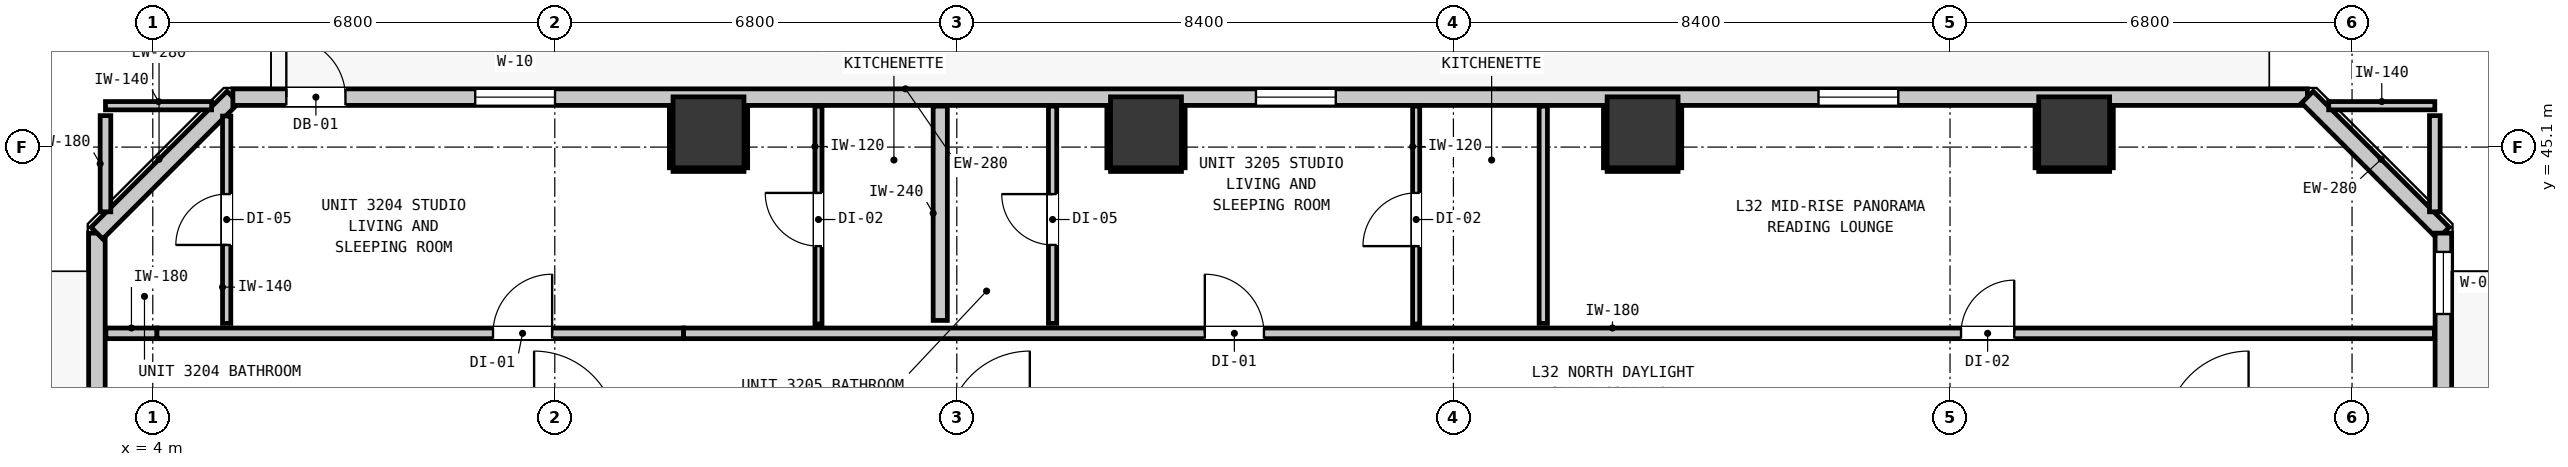
"""IFC4 building model, lengths in metres.
Left out: names, types, materials, properties, quantities, classifications, styles, units other than length and angle.
Written with IfcOpenShell. Run it as: python <this file> out.ifc"""

import sys

from ifc_helpers import new_model, si_unit, direction, frame, frame_2d, origin, origin_2d, place, context, subcontext, project, spatial, rectangle, extrude, element, fill, save


model = new_model("IFC4")
c1 = context("Model", 3, precision=1e-05, world=origin(), true_north=direction((0.0, 1.0)))
c2 = subcontext(c1, "Body", "Model", "MODEL_VIEW")
j1 = project(units=[si_unit("LENGTHUNIT", "METRE"), si_unit("PLANEANGLEUNIT", "RADIAN")], contexts=[c1])
p1 = place(None, origin())
s1 = spatial("IfcSite", under=j1, at=p1, CompositionType="ELEMENT")
p2 = place(p1, origin())
s2 = spatial("IfcBuilding", under=s1, at=p2, CompositionType="ELEMENT")
p3 = place(p2, frame((0.0, 0.0, 112.72)))
s3 = spatial("IfcBuildingStorey", under=s2, at=p3, CompositionType="ELEMENT", Elevation=112.72)
for number, where, z_axis, x_axis in (
    (1, (13.4, 45.35, 0.0), (0.0, 0.0, 1.0), (1.0, 0.0, 0.0)),
    (2, (20.8, 45.35, 0.0), (0.0, 0.0, 1.0), (1.0, 0.0, 0.0)),
    (3, (29.2, 45.35, 0.0), (0.0, 0.0, 1.0), (1.0, 0.0, 0.0)),
    (4, (36.5, 45.35, 0.0), (0.0, 0.0, 1.0), (1.0, 0.0, 0.0)),
):
    element("IfcColumn", number, at=place(p3, frame(where, z_axis=z_axis, x_axis=x_axis)), inside=s3, PredefinedType="COLUMN", context=c2, shape_type="SweptSolid", body=[
        extrude(rectangle(XDim=1.2, YDim=1.2, at=origin_2d()), origin(), (0.0, 0.0, 1.0), 3.32),
    ])
p4 = place(p3, frame((3.055, 11.355, 0.0), z_axis=(0.0, 0.0, 1.0), x_axis=(0.0, 1.0, 0.0)))
e5 = element("IfcWall", 5, at=p4, inside=s3, PredefinedType="STANDARD", context=c2, shape_type="SweptSolid", body=[
    extrude(rectangle(XDim=32.29, YDim=0.28, at=frame_2d((16.145, 0.0))), origin(), (0.0, 0.0, 1.0), 3.08),
])
p5 = place(p4, frame((5.818, 0.0, 0.0)))
e6 = element("IfcOpeningElement", 6, at=p5, cuts=e5, PredefinedType="OPENING", context=c2, shape_type="SweptSolid", body=[
    extrude(rectangle(XDim=1.0, YDim=2.15, at=frame_2d((0.5, 1.075))), frame((0.0, 0.15, 0.0), z_axis=(0.0, -1.0, 0.0), x_axis=(1.0, 0.0, 0.0)), (0.0, 0.0, 1.0), 0.3),
])
p6 = place(p4, frame((0.395, 0.0, 0.85)))
e7 = element("IfcOpeningElement", 7, at=p6, cuts=e5, PredefinedType="OPENING", context=c2, shape_type="SweptSolid", body=[
    extrude(rectangle(XDim=1.35, YDim=1.85, at=frame_2d((0.675, 0.925))), frame((0.0, 0.15, 0.0), z_axis=(0.0, -1.0, 0.0), x_axis=(1.0, 0.0, 0.0)), (0.0, 0.0, 1.0), 0.3),
])
p7 = place(p4, frame((20.78, 0.0, 0.85)))
e8 = element("IfcOpeningElement", 8, at=p7, cuts=e5, PredefinedType="OPENING", context=c2, shape_type="SweptSolid", body=[
    extrude(rectangle(XDim=1.35, YDim=1.85, at=frame_2d((0.675, 0.925))), frame((0.0, 0.15, 0.0), z_axis=(0.0, -1.0, 0.0), x_axis=(1.0, 0.0, 0.0)), (0.0, 0.0, 1.0), 0.3),
])
p8 = place(p4, frame((12.61, 0.0, 0.85)))
e9 = element("IfcOpeningElement", 9, at=p8, cuts=e5, PredefinedType="OPENING", context=c2, shape_type="SweptSolid", body=[
    extrude(rectangle(XDim=1.35, YDim=1.85, at=frame_2d((0.675, 0.925))), frame((0.0, 0.15, 0.0), z_axis=(0.0, -1.0, 0.0), x_axis=(1.0, 0.0, 0.0)), (0.0, 0.0, 1.0), 0.3),
])
p9 = place(p4, frame((24.73, 0.0, 0.85)))
e10 = element("IfcOpeningElement", 10, at=p9, cuts=e5, PredefinedType="OPENING", context=c2, shape_type="SweptSolid", body=[
    extrude(rectangle(XDim=1.35, YDim=1.85, at=frame_2d((0.675, 0.925))), frame((0.0, 0.15, 0.0), z_axis=(0.0, -1.0, 0.0), x_axis=(1.0, 0.0, 0.0)), (0.0, 0.0, 1.0), 0.3),
])
p10 = place(p3, frame((3.055, 43.645, 0.0), z_axis=(0.0, 0.0, 1.0), x_axis=(0.707106781187, 0.707106781187, 0.0)))
e11 = element("IfcWall", 11, at=p10, inside=s3, PredefinedType="STANDARD", context=c2, shape_type="SweptSolid", body=[
    extrude(rectangle(XDim=3.253, YDim=0.28, at=frame_2d((1.626, 0.0))), origin(), (0.0, 0.0, 1.0), 3.08),
])
p11 = place(p3, frame((5.355, 45.945, 0.0), z_axis=(0.0, 0.0, 1.0), x_axis=(1.0, 0.0, 0.0)))
e12 = element("IfcWall", 12, at=p11, inside=s3, PredefinedType="STANDARD", context=c2, shape_type="SweptSolid", body=[
    extrude(rectangle(XDim=35.09, YDim=0.28, at=frame_2d((17.545, 0.0))), origin(), (0.0, 0.0, 1.0), 3.08),
])
p12 = place(p11, frame((0.904, 0.0, 0.0)))
e13 = element("IfcOpeningElement", 13, at=p12, cuts=e12, PredefinedType="OPENING", context=c2, shape_type="SweptSolid", body=[
    extrude(rectangle(XDim=1.0, YDim=2.15, at=frame_2d((0.5, 1.075))), frame((0.0, 0.15, 0.0), z_axis=(0.0, -1.0, 0.0), x_axis=(1.0, 0.0, 0.0)), (0.0, 0.0, 1.0), 0.3),
])
p13 = place(p11, frame((4.099, 0.0, 0.85)))
e14 = element("IfcOpeningElement", 14, at=p13, cuts=e12, PredefinedType="OPENING", context=c2, shape_type="SweptSolid", body=[
    extrude(rectangle(XDim=1.35, YDim=1.85, at=frame_2d((0.675, 0.925))), frame((0.0, 0.15, 0.0), z_axis=(0.0, -1.0, 0.0), x_axis=(1.0, 0.0, 0.0)), (0.0, 0.0, 1.0), 0.3),
])
p14 = place(p11, frame((17.305, 0.0, 0.85)))
e15 = element("IfcOpeningElement", 15, at=p14, cuts=e12, PredefinedType="OPENING", context=c2, shape_type="SweptSolid", body=[
    extrude(rectangle(XDim=1.35, YDim=1.85, at=frame_2d((0.675, 0.925))), frame((0.0, 0.15, 0.0), z_axis=(0.0, -1.0, 0.0), x_axis=(1.0, 0.0, 0.0)), (0.0, 0.0, 1.0), 0.3),
])
p15 = place(p11, frame((26.82, 0.0, 0.85)))
e16 = element("IfcOpeningElement", 16, at=p15, cuts=e12, PredefinedType="OPENING", context=c2, shape_type="SweptSolid", body=[
    extrude(rectangle(XDim=1.35, YDim=1.85, at=frame_2d((0.675, 0.925))), frame((0.0, 0.15, 0.0), z_axis=(0.0, -1.0, 0.0), x_axis=(1.0, 0.0, 0.0)), (0.0, 0.0, 1.0), 0.3),
])
p16 = place(p3, frame((40.445, 45.945, 0.0), z_axis=(0.0, 0.0, 1.0), x_axis=(0.707106781187, -0.707106781187, 0.0)))
e17 = element("IfcWall", 17, at=p16, inside=s3, PredefinedType="STANDARD", context=c2, shape_type="SweptSolid", body=[
    extrude(rectangle(XDim=3.253, YDim=0.28, at=frame_2d((1.626, 0.0))), origin(), (0.0, 0.0, 1.0), 3.08),
])
p17 = place(p3, frame((42.745, 43.645, 0.0), z_axis=(0.0, 0.0, 1.0), x_axis=(0.0, -1.0, 0.0)))
e18 = element("IfcWall", 18, at=p17, inside=s3, PredefinedType="STANDARD", context=c2, shape_type="SweptSolid", body=[
    extrude(rectangle(XDim=32.29, YDim=0.28, at=frame_2d((16.145, 0.0))), origin(), (0.0, 0.0, 1.0), 3.08),
])
p18 = place(p17, frame((5.467, 0.0, 0.0)))
e19 = element("IfcOpeningElement", 19, at=p18, cuts=e18, PredefinedType="OPENING", context=c2, shape_type="SweptSolid", body=[
    extrude(rectangle(XDim=1.0, YDim=2.15, at=frame_2d((0.5, 1.075))), frame((0.0, 0.15, 0.0), z_axis=(0.0, -1.0, 0.0), x_axis=(1.0, 0.0, 0.0)), (0.0, 0.0, 1.0), 0.3),
])
p19 = place(p17, frame((0.318, 0.0, 0.85)))
e20 = element("IfcOpeningElement", 20, at=p19, cuts=e18, PredefinedType="OPENING", context=c2, shape_type="SweptSolid", body=[
    extrude(rectangle(XDim=1.05, YDim=1.65, at=frame_2d((0.525, 0.825))), frame((0.0, 0.15, 0.0), z_axis=(0.0, -1.0, 0.0), x_axis=(1.0, 0.0, 0.0)), (0.0, 0.0, 1.0), 0.3),
])
p20 = place(p17, frame((14.648, 0.0, 0.85)))
e21 = element("IfcOpeningElement", 21, at=p20, cuts=e18, PredefinedType="OPENING", context=c2, shape_type="SweptSolid", body=[
    extrude(rectangle(XDim=1.35, YDim=1.85, at=frame_2d((0.675, 0.925))), frame((0.0, 0.15, 0.0), z_axis=(0.0, -1.0, 0.0), x_axis=(1.0, 0.0, 0.0)), (0.0, 0.0, 1.0), 0.3),
])
p21 = place(p3, frame((3.207, 41.95, 0.0), z_axis=(0.0, 0.0, 1.0), x_axis=(1.0, 0.0, 0.0)))
e22 = element("IfcWall", 22, at=p21, inside=s3, PredefinedType="PARTITIONING", context=c2, shape_type="SweptSolid", body=[
    extrude(rectangle(XDim=0.864, YDim=0.18, at=frame_2d((0.432, 0.0))), origin(), (0.0, 0.0, 1.0), 3.08),
])
p22 = place(p3, frame((4.071, 41.95, 0.0), z_axis=(0.0, 0.0, 1.0), x_axis=(1.0, 0.0, 0.0)))
e23 = element("IfcWall", 23, at=p22, inside=s3, PredefinedType="PARTITIONING", context=c2, shape_type="SweptSolid", body=[
    extrude(rectangle(XDim=8.908, YDim=0.18, at=frame_2d((4.454, 0.0))), origin(), (0.0, 0.0, 1.0), 2.565),
])
p23 = place(p22, frame((5.684, 0.0, 0.0)))
e24 = element("IfcOpeningElement", 24, at=p23, cuts=e23, PredefinedType="OPENING", context=c2, shape_type="SweptSolid", body=[
    extrude(rectangle(XDim=1.0, YDim=2.15, at=frame_2d((0.5, 1.075))), frame((0.0, 0.1, 0.0), z_axis=(0.0, -1.0, 0.0), x_axis=(1.0, 0.0, 0.0)), (0.0, 0.0, 1.0), 0.2),
])
p24 = place(p3, frame((12.979, 41.95, 0.0), z_axis=(0.0, 0.0, 1.0), x_axis=(1.0, 0.0, 0.0)))
e25 = element("IfcWall", 25, at=p24, inside=s3, PredefinedType="PARTITIONING", context=c2, shape_type="SweptSolid", body=[
    extrude(rectangle(XDim=29.614, YDim=0.18, at=frame_2d((14.807, 0.0))), origin(), (0.0, 0.0, 1.0), 3.08),
])
p25 = place(p24, frame((8.816, 0.0, 0.0)))
e26 = element("IfcOpeningElement", 26, at=p25, cuts=e25, PredefinedType="OPENING", context=c2, shape_type="SweptSolid", body=[
    extrude(rectangle(XDim=1.0, YDim=2.15, at=frame_2d((0.5, 1.075))), frame((0.0, 0.1, 0.0), z_axis=(0.0, -1.0, 0.0), x_axis=(1.0, 0.0, 0.0)), (0.0, 0.0, 1.0), 0.2),
])
p26 = place(p24, frame((21.607, 0.0, 0.0)))
e27 = element("IfcOpeningElement", 27, at=p26, cuts=e25, PredefinedType="OPENING", context=c2, shape_type="SweptSolid", body=[
    extrude(rectangle(XDim=0.9, YDim=2.1, at=frame_2d((0.45, 1.05))), frame((0.0, 0.1, 0.0), z_axis=(0.0, -1.0, 0.0), x_axis=(1.0, 0.0, 0.0)), (0.0, 0.0, 1.0), 0.2),
])
for number, where, z_axis, x_axis in (
    (28, (3.2, 45.8, 0.0), (0.0, 0.0, 1.0), (1.0, 0.0, 0.0)),
    (29, (40.805, 45.8, 0.0), (0.0, 0.0, 1.0), (1.0, 0.0, 0.0)),
):
    element("IfcWall", number, at=place(p3, frame(where, z_axis=z_axis, x_axis=x_axis)), inside=s3, PredefinedType="PARTITIONING", context=c2, shape_type="SweptSolid", body=[
        extrude(rectangle(XDim=1.795, YDim=0.14, at=frame_2d((0.897, 0.0))), origin(), (0.0, 0.0, 1.0), 3.08),
    ])
p27 = place(p3, frame((17.32, 42.168, 0.0), z_axis=(0.0, 0.0, 1.0), x_axis=(0.0, 1.0, 0.0)))
e30 = element("IfcWall", 30, at=p27, inside=s3, PredefinedType="PARTITIONING", context=c2, shape_type="SweptSolid", body=[
    extrude(rectangle(XDim=3.625, YDim=0.24, at=frame_2d((1.812, 0.0))), origin(), (0.0, 0.0, 1.0), 3.08),
])
for number, where, z_axis, x_axis in (
    (31, (3.2, 44.005, 0.0), (0.0, 0.0, 1.0), (0.0, 1.0, 0.0)),
    (32, (42.6, 44.005, 0.0), (0.0, 0.0, 1.0), (0.0, 1.0, 0.0)),
):
    element("IfcWall", number, at=place(p3, frame(where, z_axis=z_axis, x_axis=x_axis)), inside=s3, PredefinedType="PARTITIONING", context=c2, shape_type="SweptSolid", body=[
        extrude(rectangle(XDim=1.627, YDim=0.18, at=frame_2d((0.813, 0.0))), origin(), (0.0, 0.0, 1.0), 3.08),
    ])
p28 = place(p3, frame((5.25, 42.118, 0.0), z_axis=(0.0, 0.0, 1.0), x_axis=(0.0, 1.0, 0.0)))
e33 = element("IfcWall", 33, at=p28, inside=s3, PredefinedType="PARTITIONING", context=c2, shape_type="SweptSolid", body=[
    extrude(rectangle(XDim=3.507, YDim=0.14, at=frame_2d((1.753, 0.0))), origin(), (0.0, 0.0, 1.0), 3.08),
])
p29 = place(p28, frame((1.327, 0.0, 0.0)))
e34 = element("IfcOpeningElement", 34, at=p29, cuts=e33, PredefinedType="OPENING", context=c2, shape_type="SweptSolid", body=[
    extrude(rectangle(XDim=0.86, YDim=2.02, at=frame_2d((0.43, 1.01))), frame((0.0, 0.08, 0.0), z_axis=(0.0, -1.0, 0.0), x_axis=(1.0, 0.0, 0.0)), (0.0, 0.0, 1.0), 0.16),
])
p30 = place(p3, frame((19.22, 42.118, 0.0), z_axis=(0.0, 0.0, 1.0), x_axis=(0.0, 1.0, 0.0)))
e35 = element("IfcWall", 35, at=p30, inside=s3, PredefinedType="PARTITIONING", context=c2, shape_type="SweptSolid", body=[
    extrude(rectangle(XDim=3.675, YDim=0.14, at=frame_2d((1.837, 0.0))), origin(), (0.0, 0.0, 1.0), 3.08),
])
p31 = place(p30, frame((1.327, 0.0, 0.0)))
e36 = element("IfcOpeningElement", 36, at=p31, cuts=e35, PredefinedType="OPENING", context=c2, shape_type="SweptSolid", body=[
    extrude(rectangle(XDim=0.86, YDim=2.02, at=frame_2d((0.43, 1.01))), frame((0.0, 0.08, 0.0), z_axis=(0.0, -1.0, 0.0), x_axis=(1.0, 0.0, 0.0)), (0.0, 0.0, 1.0), 0.16),
])
p32 = place(p3, frame((27.52, 42.118, 0.0), z_axis=(0.0, 0.0, 1.0), x_axis=(0.0, 1.0, 0.0)))
e37 = element("IfcWall", 37, at=p32, inside=s3, PredefinedType="PARTITIONING", context=c2, shape_type="SweptSolid", body=[
    extrude(rectangle(XDim=3.675, YDim=0.14, at=frame_2d((1.837, 0.0))), origin(), (0.0, 0.0, 1.0), 3.08),
])
p33 = place(p3, frame((15.26, 42.108, 0.0), z_axis=(0.0, 0.0, 1.0), x_axis=(0.0, 1.0, 0.0)))
e38 = element("IfcWall", 38, at=p33, inside=s3, PredefinedType="PARTITIONING", context=c2, shape_type="SweptSolid", body=[
    extrude(rectangle(XDim=3.685, YDim=0.12, at=frame_2d((1.843, 0.0))), origin(), (0.0, 0.0, 1.0), 3.08),
])
p34 = place(p33, frame((1.317, 0.0, 0.0)))
e39 = element("IfcOpeningElement", 39, at=p34, cuts=e38, PredefinedType="OPENING", context=c2, shape_type="SweptSolid", body=[
    extrude(rectangle(XDim=0.9, YDim=2.1, at=frame_2d((0.45, 1.05))), frame((0.0, 0.07, 0.0), z_axis=(0.0, -1.0, 0.0), x_axis=(1.0, 0.0, 0.0)), (0.0, 0.0, 1.0), 0.14),
])
p35 = place(p3, frame((25.37, 42.108, 0.0), z_axis=(0.0, 0.0, 1.0), x_axis=(0.0, 1.0, 0.0)))
e40 = element("IfcWall", 40, at=p35, inside=s3, PredefinedType="PARTITIONING", context=c2, shape_type="SweptSolid", body=[
    extrude(rectangle(XDim=3.685, YDim=0.12, at=frame_2d((1.843, 0.0))), origin(), (0.0, 0.0, 1.0), 3.08),
])
p36 = place(p35, frame((1.317, 0.0, 0.0)))
e41 = element("IfcOpeningElement", 41, at=p36, cuts=e40, PredefinedType="OPENING", context=c2, shape_type="SweptSolid", body=[
    extrude(rectangle(XDim=0.9, YDim=2.1, at=frame_2d((0.45, 1.05))), frame((0.0, 0.07, 0.0), z_axis=(0.0, -1.0, 0.0), x_axis=(1.0, 0.0, 0.0)), (0.0, 0.0, 1.0), 0.14),
])
p37 = place(p3, frame((12.8, 44.718, 0.0), z_axis=(0.0, 0.0, 1.0), x_axis=(1.0, 0.0, 0.0)))
e42 = element("IfcWall", 42, at=p37, inside=s3, PredefinedType="PARTITIONING", context=c2, shape_type="SweptSolid", body=[
    extrude(rectangle(XDim=1.2, YDim=0.06, at=frame_2d((0.6, 0.0))), origin(), (0.0, 0.0, 1.0), 1.45),
])
for number, where, z_axis, x_axis in (
    (43, (12.768, 44.75, 0.0), (0.0, 0.0, 1.0), (0.0, 1.0, 0.0)),
    (44, (14.032, 44.75, 0.0), (0.0, 0.0, 1.0), (0.0, 1.0, 0.0)),
):
    element("IfcWall", number, at=place(p3, frame(where, z_axis=z_axis, x_axis=x_axis)), inside=s3, PredefinedType="PARTITIONING", context=c2, shape_type="SweptSolid", body=[
        extrude(rectangle(XDim=1.04, YDim=0.06, at=frame_2d((0.52, 0.0))), origin(), (0.0, 0.0, 1.0), 1.45),
    ])
p38 = place(p3, frame((20.2, 44.718, 0.0), z_axis=(0.0, 0.0, 1.0), x_axis=(1.0, 0.0, 0.0)))
e45 = element("IfcWall", 45, at=p38, inside=s3, PredefinedType="PARTITIONING", context=c2, shape_type="SweptSolid", body=[
    extrude(rectangle(XDim=1.2, YDim=0.06, at=frame_2d((0.6, 0.0))), origin(), (0.0, 0.0, 1.0), 1.45),
])
for number, where, z_axis, x_axis in (
    (46, (20.168, 44.75, 0.0), (0.0, 0.0, 1.0), (0.0, 1.0, 0.0)),
    (47, (21.432, 44.75, 0.0), (0.0, 0.0, 1.0), (0.0, 1.0, 0.0)),
):
    element("IfcWall", number, at=place(p3, frame(where, z_axis=z_axis, x_axis=x_axis)), inside=s3, PredefinedType="PARTITIONING", context=c2, shape_type="SweptSolid", body=[
        extrude(rectangle(XDim=1.04, YDim=0.06, at=frame_2d((0.52, 0.0))), origin(), (0.0, 0.0, 1.0), 1.45),
    ])
p39 = place(p3, frame((28.6, 44.718, 0.0), z_axis=(0.0, 0.0, 1.0), x_axis=(1.0, 0.0, 0.0)))
e48 = element("IfcWall", 48, at=p39, inside=s3, PredefinedType="PARTITIONING", context=c2, shape_type="SweptSolid", body=[
    extrude(rectangle(XDim=1.2, YDim=0.06, at=frame_2d((0.6, 0.0))), origin(), (0.0, 0.0, 1.0), 1.45),
])
for number, where, z_axis, x_axis in (
    (49, (28.568, 44.75, 0.0), (0.0, 0.0, 1.0), (0.0, 1.0, 0.0)),
    (50, (29.832, 44.75, 0.0), (0.0, 0.0, 1.0), (0.0, 1.0, 0.0)),
):
    element("IfcWall", number, at=place(p3, frame(where, z_axis=z_axis, x_axis=x_axis)), inside=s3, PredefinedType="PARTITIONING", context=c2, shape_type="SweptSolid", body=[
        extrude(rectangle(XDim=1.04, YDim=0.06, at=frame_2d((0.52, 0.0))), origin(), (0.0, 0.0, 1.0), 1.45),
    ])
p40 = place(p3, frame((35.9, 44.718, 0.0), z_axis=(0.0, 0.0, 1.0), x_axis=(1.0, 0.0, 0.0)))
e51 = element("IfcWall", 51, at=p40, inside=s3, PredefinedType="PARTITIONING", context=c2, shape_type="SweptSolid", body=[
    extrude(rectangle(XDim=1.2, YDim=0.06, at=frame_2d((0.6, 0.0))), origin(), (0.0, 0.0, 1.0), 1.45),
])
for number, where, z_axis, x_axis in (
    (52, (35.868, 44.75, 0.0), (0.0, 0.0, 1.0), (0.0, 1.0, 0.0)),
    (53, (37.132, 44.75, 0.0), (0.0, 0.0, 1.0), (0.0, 1.0, 0.0)),
):
    element("IfcWall", number, at=place(p3, frame(where, z_axis=z_axis, x_axis=x_axis)), inside=s3, PredefinedType="PARTITIONING", context=c2, shape_type="SweptSolid", body=[
        extrude(rectangle(XDim=1.04, YDim=0.06, at=frame_2d((0.52, 0.0))), origin(), (0.0, 0.0, 1.0), 1.45),
    ])
p41 = place(p12, origin())
e54 = element("IfcDoor", 54, at=p41, inside=s3, OperationType="SINGLE_SWING_LEFT", PredefinedType="DOOR", context=c2, shape_type="SweptSolid", body=[
    extrude(rectangle(XDim=1.0, YDim=2.15, at=frame_2d((0.5, 1.075))), frame((0.0, 0.025, 0.0), z_axis=(0.0, -1.0, 0.0), x_axis=(1.0, 0.0, 0.0)), (0.0, 0.0, 1.0), 0.05),
])
fill(e13, e54)
p42 = place(p13, origin())
e55 = element("IfcWindow", 55, at=p42, inside=s3, PartitioningType="SINGLE_PANEL", PredefinedType="WINDOW", context=c2, shape_type="SweptSolid", body=[
    extrude(rectangle(XDim=1.35, YDim=1.85, at=frame_2d((0.675, 0.925))), frame((0.0, 0.03, 0.0), z_axis=(0.0, -1.0, 0.0), x_axis=(1.0, 0.0, 0.0)), (0.0, 0.0, 1.0), 0.06),
])
fill(e14, e55)
p43 = place(p14, origin())
e56 = element("IfcWindow", 56, at=p43, inside=s3, PartitioningType="SINGLE_PANEL", PredefinedType="WINDOW", context=c2, shape_type="SweptSolid", body=[
    extrude(rectangle(XDim=1.35, YDim=1.85, at=frame_2d((0.675, 0.925))), frame((0.0, 0.03, 0.0), z_axis=(0.0, -1.0, 0.0), x_axis=(1.0, 0.0, 0.0)), (0.0, 0.0, 1.0), 0.06),
])
fill(e15, e56)
p44 = place(p15, origin())
e57 = element("IfcWindow", 57, at=p44, inside=s3, PartitioningType="SINGLE_PANEL", PredefinedType="WINDOW", context=c2, shape_type="SweptSolid", body=[
    extrude(rectangle(XDim=1.35, YDim=1.85, at=frame_2d((0.675, 0.925))), frame((0.0, 0.03, 0.0), z_axis=(0.0, -1.0, 0.0), x_axis=(1.0, 0.0, 0.0)), (0.0, 0.0, 1.0), 0.06),
])
fill(e16, e57)
p45 = place(p19, origin())
e58 = element("IfcWindow", 58, at=p45, inside=s3, PartitioningType="SINGLE_PANEL", PredefinedType="WINDOW", context=c2, shape_type="SweptSolid", body=[
    extrude(rectangle(XDim=1.05, YDim=1.65, at=frame_2d((0.525, 0.825))), frame((0.0, 0.03, 0.0), z_axis=(0.0, -1.0, 0.0), x_axis=(1.0, 0.0, 0.0)), (0.0, 0.0, 1.0), 0.06),
])
fill(e20, e58)
p46 = place(p23, origin())
e59 = element("IfcDoor", 59, at=p46, inside=s3, OperationType="SINGLE_SWING_RIGHT", PredefinedType="DOOR", context=c2, shape_type="SweptSolid", body=[
    extrude(rectangle(XDim=1.0, YDim=2.15, at=frame_2d((0.5, 1.075))), frame((0.0, 0.025, 0.0), z_axis=(0.0, -1.0, 0.0), x_axis=(1.0, 0.0, 0.0)), (0.0, 0.0, 1.0), 0.05),
])
fill(e24, e59)
p47 = place(p29, origin())
e60 = element("IfcDoor", 60, at=p47, inside=s3, OperationType="SINGLE_SWING_LEFT", PredefinedType="DOOR", context=c2, shape_type="SweptSolid", body=[
    extrude(rectangle(XDim=0.86, YDim=2.02, at=frame_2d((0.43, 1.01))), frame((0.0, 0.025, 0.0), z_axis=(0.0, -1.0, 0.0), x_axis=(1.0, 0.0, 0.0)), (0.0, 0.0, 1.0), 0.05),
])
fill(e34, e60)
p48 = place(p34, origin())
e61 = element("IfcDoor", 61, at=p48, inside=s3, OperationType="SINGLE_SWING_RIGHT", PredefinedType="DOOR", context=c2, shape_type="SweptSolid", body=[
    extrude(rectangle(XDim=0.9, YDim=2.1, at=frame_2d((0.45, 1.05))), frame((0.0, 0.025, 0.0), z_axis=(0.0, -1.0, 0.0), x_axis=(1.0, 0.0, 0.0)), (0.0, 0.0, 1.0), 0.05),
])
fill(e39, e61)
p49 = place(p25, origin())
e62 = element("IfcDoor", 62, at=p49, inside=s3, OperationType="SINGLE_SWING_LEFT", PredefinedType="DOOR", context=c2, shape_type="SweptSolid", body=[
    extrude(rectangle(XDim=1.0, YDim=2.15, at=frame_2d((0.5, 1.075))), frame((0.0, 0.025, 0.0), z_axis=(0.0, -1.0, 0.0), x_axis=(1.0, 0.0, 0.0)), (0.0, 0.0, 1.0), 0.05),
])
fill(e26, e62)
p50 = place(p31, origin())
e63 = element("IfcDoor", 63, at=p50, inside=s3, OperationType="SINGLE_SWING_RIGHT", PredefinedType="DOOR", context=c2, shape_type="SweptSolid", body=[
    extrude(rectangle(XDim=0.86, YDim=2.02, at=frame_2d((0.43, 1.01))), frame((0.0, 0.025, 0.0), z_axis=(0.0, -1.0, 0.0), x_axis=(1.0, 0.0, 0.0)), (0.0, 0.0, 1.0), 0.05),
])
fill(e36, e63)
p51 = place(p36, origin())
e64 = element("IfcDoor", 64, at=p51, inside=s3, OperationType="SINGLE_SWING_LEFT", PredefinedType="DOOR", context=c2, shape_type="SweptSolid", body=[
    extrude(rectangle(XDim=0.9, YDim=2.1, at=frame_2d((0.45, 1.05))), frame((0.0, 0.025, 0.0), z_axis=(0.0, -1.0, 0.0), x_axis=(1.0, 0.0, 0.0)), (0.0, 0.0, 1.0), 0.05),
])
fill(e41, e64)
p52 = place(p26, origin())
e65 = element("IfcDoor", 65, at=p52, inside=s3, OperationType="SINGLE_SWING_RIGHT", PredefinedType="DOOR", context=c2, shape_type="SweptSolid", body=[
    extrude(rectangle(XDim=0.9, YDim=2.1, at=frame_2d((0.45, 1.05))), frame((0.0, 0.025, 0.0), z_axis=(0.0, -1.0, 0.0), x_axis=(1.0, 0.0, 0.0)), (0.0, 0.0, 1.0), 0.05),
])
fill(e27, e65)
save(model, sys.argv[1])
